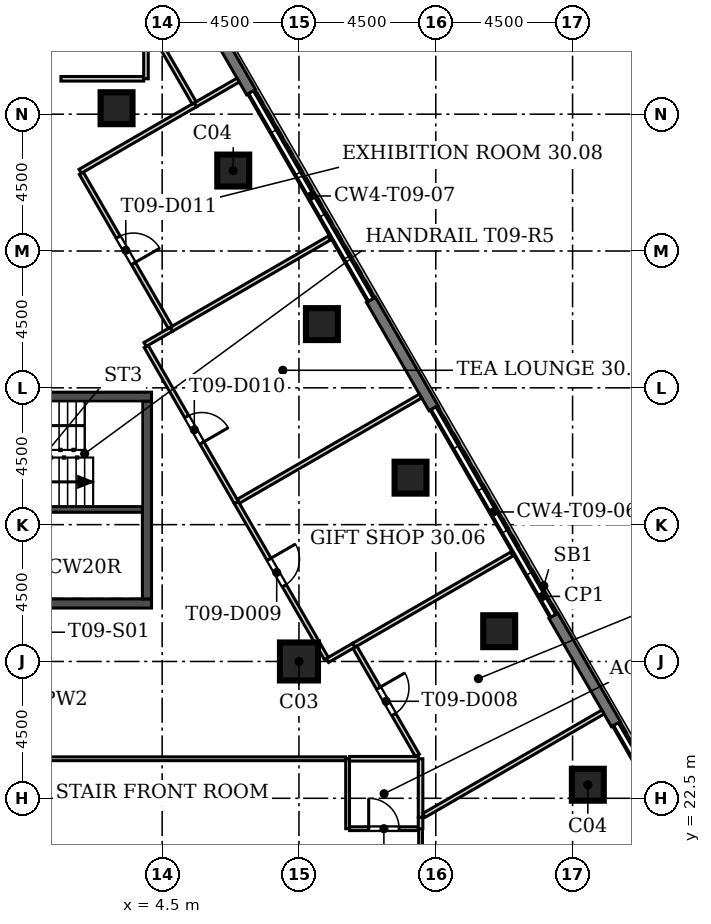
"""IFC4 building model, lengths in metres.
Left out: names, types, materials, properties, quantities, classifications, styles, units other than length and angle.
Written with IfcOpenShell. Run it as: python <this file> out.ifc"""

import sys

from ifc_helpers import new_model, si_unit, direction, frame, frame_2d, origin, origin_2d, place, context, subcontext, project, spatial, rectangle, extrude, element, fill, save


model = new_model("IFC4")
c1 = context("Model", 3, precision=1e-05, world=origin(), true_north=direction((0.0, 1.0)))
c2 = subcontext(c1, "Body", "Model", "MODEL_VIEW")
j1 = project(units=[si_unit("LENGTHUNIT", "METRE"), si_unit("PLANEANGLEUNIT", "RADIAN")], contexts=[c1])
p1 = place(None, origin())
s1 = spatial("IfcSite", under=j1, at=p1, CompositionType="ELEMENT")
p2 = place(p1, origin())
s2 = spatial("IfcBuilding", under=s1, at=p2, CompositionType="ELEMENT")
p3 = place(p2, frame((0.0, 0.0, 137.5)))
s3 = spatial("IfcBuildingStorey", under=s2, at=p3, CompositionType="ELEMENT", Elevation=137.5)
for number, where, z_axis, x_axis in (
    (1, (18.502, 22.945, 0.0), (0.0, 0.0, 1.0), (1.0, 0.0, 0.0)),
    (2, (15.586, 27.995, 0.0), (0.0, 0.0, 1.0), (1.0, 0.0, 0.0)),
    (3, (12.67, 33.046, 0.0), (0.0, 0.0, 1.0), (1.0, 0.0, 0.0)),
    (4, (9.754, 38.096, 0.0), (0.0, 0.0, 1.0), (1.0, 0.0, 0.0)),
    (5, (6.838, 43.146, 0.0), (0.0, 0.0, 1.0), (1.0, 0.0, 0.0)),
    (6, (3.0, 45.197, 0.0), (0.0, 0.0, 1.0), (1.0, 0.0, 0.0)),
):
    element("IfcColumn", number, at=place(p3, frame(where, z_axis=z_axis, x_axis=x_axis)), inside=s3, PredefinedType="COLUMN", context=c2, shape_type="SweptSolid", body=[
        extrude(rectangle(XDim=1.05, YDim=1.05, at=origin_2d()), origin(), (0.0, 0.0, 1.0), 5.4),
    ])
p4 = place(p3, frame((9.0, 27.0, 0.0), z_axis=(0.0, 0.0, 1.0), x_axis=(1.0, 0.0, 0.0)))
e7 = element("IfcColumn", 7, at=p4, inside=s3, PredefinedType="COLUMN", context=c2, shape_type="SweptSolid", body=[
    extrude(rectangle(XDim=1.25, YDim=1.25, at=origin_2d()), origin(), (0.0, 0.0, 1.0), 5.4),
])
for number, where, z_axis, x_axis in (
    (8, (19.426, 24.939, 0.0), (0.0, 0.0, 1.0), (-0.5, 0.866, 0.0)),
    (9, (13.426, 35.332, 0.0), (0.0, 0.0, 1.0), (-0.5, 0.866, 0.0)),
):
    element("IfcWall", number, at=place(p3, frame(where, z_axis=z_axis, x_axis=x_axis)), inside=s3, PredefinedType="SOLIDWALL", context=c2, shape_type="SweptSolid", body=[
        extrude(rectangle(XDim=4.115, YDim=0.34, at=frame_2d((2.058, 0.0))), origin(), (0.0, 0.0, 1.0), 5.0),
    ])
p5 = place(p3, frame((7.426, 45.724, 0.0), z_axis=(0.0, 0.0, 1.0), x_axis=(-0.500018155671, 0.866014921349, 0.0)))
e10 = element("IfcWall", 10, at=p5, inside=s3, PredefinedType="SOLIDWALL", context=c2, shape_type="SweptSolid", body=[
    extrude(rectangle(XDim=6.146, YDim=0.34, at=frame_2d((3.073, 0.0))), origin(), (0.0, 0.0, 1.0), 5.0),
])
p6 = place(p3, frame((-4.15, 28.907, -0.4), z_axis=(0.0, 0.0, 1.0), x_axis=(1.0, 0.0, 0.0)))
e11 = element("IfcWall", 11, at=p6, inside=s3, PredefinedType="SOLIDWALL", context=c2, shape_type="SweptSolid", body=[
    extrude(rectangle(XDim=8.3, YDim=0.3, at=frame_2d((4.15, 0.0))), origin(), (0.0, 0.0, 1.0), 5.4),
])
p7 = place(p6, frame((1.55, 0.0, 0.4)))
e12 = element("IfcOpeningElement", 12, at=p7, cuts=e11, PredefinedType="OPENING", context=c2, shape_type="SweptSolid", body=[
    extrude(rectangle(XDim=1.2, YDim=2.1, at=frame_2d((0.6, 1.05))), frame((0.0, 0.16, 0.0), z_axis=(0.0, -1.0, 0.0), x_axis=(1.0, 0.0, 0.0)), (0.0, 0.0, 1.0), 0.32),
])
p8 = place(p3, frame((-4.15, 35.707, -0.4), z_axis=(0.0, 0.0, 1.0), x_axis=(1.0, 0.0, 0.0)))
e13 = element("IfcWall", 13, at=p8, inside=s3, PredefinedType="SOLIDWALL", context=c2, shape_type="SweptSolid", body=[
    extrude(rectangle(XDim=8.3, YDim=0.3, at=frame_2d((4.15, 0.0))), origin(), (0.0, 0.0, 1.0), 5.4),
])
p9 = place(p3, frame((4.0, 29.057, -0.4), z_axis=(0.0, 0.0, 1.0), x_axis=(0.0, 1.0, 0.0)))
e14 = element("IfcWall", 14, at=p9, inside=s3, PredefinedType="SOLIDWALL", context=c2, shape_type="SweptSolid", body=[
    extrude(rectangle(XDim=6.5, YDim=0.3, at=frame_2d((3.25, 0.0))), origin(), (0.0, 0.0, 1.0), 5.4),
])
p10 = place(p3, frame((-3.85, 32.007, -0.4), z_axis=(0.0, 0.0, 1.0), x_axis=(1.0, 0.0, 0.0)))
e15 = element("IfcWall", 15, at=p10, inside=s3, PredefinedType="SOLIDWALL", context=c2, shape_type="SweptSolid", body=[
    extrude(rectangle(XDim=7.7, YDim=0.2, at=frame_2d((3.85, 0.0))), origin(), (0.0, 0.0, 1.0), 5.4),
])
p11 = place(p10, frame((0.1, 0.0, 0.4)))
e16 = element("IfcOpeningElement", 16, at=p11, cuts=e15, PredefinedType="OPENING", context=c2, shape_type="SweptSolid", body=[
    extrude(rectangle(XDim=1.2, YDim=2.1, at=frame_2d((0.6, 1.05))), frame((0.0, 0.11, 0.0), z_axis=(0.0, -1.0, 0.0), x_axis=(1.0, 0.0, 0.0)), (0.0, 0.0, 1.0), 0.22),
])
p12 = place(p3, frame((10.6, 23.8, 0.0), z_axis=(0.0, 0.0, 1.0), x_axis=(0.0, -1.0, 0.0)))
e17 = element("IfcWall", 17, at=p12, inside=s3, PredefinedType="PARTITIONING", context=c2, shape_type="SweptSolid", body=[
    extrude(rectangle(XDim=2.3, YDim=0.125, at=frame_2d((1.15, 0.0))), origin(), (0.0, 0.0, 1.0), 5.0),
])
p13 = place(p3, frame((10.663, 21.5, 0.0), z_axis=(0.0, 0.0, 1.0), x_axis=(1.0, 0.0, 0.0)))
e18 = element("IfcWall", 18, at=p13, inside=s3, PredefinedType="PARTITIONING", context=c2, shape_type="SweptSolid", body=[
    extrude(rectangle(XDim=2.262, YDim=0.125, at=frame_2d((1.131, 0.0))), origin(), (0.0, 0.0, 1.0), 5.0),
])
p14 = place(p13, frame((0.631, 0.0, 0.0)))
e19 = element("IfcOpeningElement", 19, at=p14, cuts=e18, PredefinedType="OPENING", context=c2, shape_type="SweptSolid", body=[
    extrude(rectangle(XDim=1.0, YDim=2.1, at=frame_2d((0.5, 1.05))), frame((0.0, 0.073, 0.0), z_axis=(0.0, -1.0, 0.0), x_axis=(1.0, 0.0, 0.0)), (0.0, 0.0, 1.0), 0.145),
])
p15 = place(p3, frame((-11.804, 23.8, 0.0), z_axis=(0.0, 0.0, 1.0), x_axis=(1.0, 0.0, 0.0)))
e20 = element("IfcWall", 20, at=p15, inside=s3, PredefinedType="PARTITIONING", context=c2, shape_type="SweptSolid", body=[
    extrude(rectangle(XDim=22.342, YDim=0.125, at=frame_2d((11.171, 0.0))), origin(), (0.0, 0.0, 1.0), 5.0),
])
p16 = place(p15, frame((7.538, 0.0, 0.0)))
e21 = element("IfcOpeningElement", 21, at=p16, cuts=e20, PredefinedType="OPENING", context=c2, shape_type="SweptSolid", body=[
    extrude(rectangle(XDim=1.8, YDim=2.1, at=frame_2d((0.9, 1.05))), frame((0.0, 0.073, 0.0), z_axis=(0.0, -1.0, 0.0), x_axis=(1.0, 0.0, 0.0)), (0.0, 0.0, 1.0), 0.145),
])
p17 = place(p15, frame((10.271, 0.0, 0.0)))
e22 = element("IfcOpeningElement", 22, at=p17, cuts=e20, PredefinedType="OPENING", context=c2, shape_type="SweptSolid", body=[
    extrude(rectangle(XDim=1.8, YDim=2.1, at=frame_2d((0.9, 1.05))), frame((0.0, 0.073, 0.0), z_axis=(0.0, -1.0, 0.0), x_axis=(1.0, 0.0, 0.0)), (0.0, 0.0, 1.0), 0.145),
])
p18 = place(p3, frame((13.0, 21.5, 0.0), z_axis=(0.0, 0.0, 1.0), x_axis=(0.0, -1.0, 0.0)))
e23 = element("IfcWall", 23, at=p18, inside=s3, PredefinedType="PARTITIONING", context=c2, shape_type="SweptSolid", body=[
    extrude(rectangle(XDim=2.637, YDim=0.125, at=frame_2d((1.319, 0.0))), origin(), (0.0, 0.0, 1.0), 5.0),
])
p19 = place(p3, frame((13.0, 23.8, 0.0), z_axis=(0.0, 0.0, 1.0), x_axis=(0.0, -1.0, 0.0)))
e24 = element("IfcWall", 24, at=p19, inside=s3, PredefinedType="PARTITIONING", context=c2, shape_type="SweptSolid", body=[
    extrude(rectangle(XDim=1.927, YDim=0.15, at=frame_2d((0.964, 0.0))), origin(), (0.0, 0.0, 1.0), 5.0),
])
p20 = place(p3, frame((10.663, 23.8, 0.0), z_axis=(0.0, 0.0, 1.0), x_axis=(1.0, 0.0, 0.0)))
e25 = element("IfcWall", 25, at=p20, inside=s3, PredefinedType="PARTITIONING", context=c2, shape_type="SweptSolid", body=[
    extrude(rectangle(XDim=2.261, YDim=0.15, at=frame_2d((1.131, 0.0))), origin(), (0.0, 0.0, 1.0), 5.0),
])
p21 = place(p3, frame((13.0, 21.873, 0.0), z_axis=(0.0, 0.0, 1.0), x_axis=(0.0, -1.0, 0.0)))
e26 = element("IfcWall", 26, at=p21, inside=s3, PredefinedType="PARTITIONING", context=c2, shape_type="SweptSolid", body=[
    extrude(rectangle(XDim=0.373, YDim=0.15, at=frame_2d((0.187, 0.0))), origin(), (0.0, 0.0, 1.0), 5.0),
])
p22 = place(p3, frame((10.804, 27.533, 0.0), z_axis=(0.0, 0.0, 1.0), x_axis=(0.866031096941, 0.499990139034, 0.0)))
e27 = element("IfcWall", 27, at=p22, inside=s3, PredefinedType="PARTITIONING", context=c2, shape_type="SweptSolid", body=[
    extrude(rectangle(XDim=6.0, YDim=0.15, at=frame_2d((3.0, 0.0))), origin(), (0.0, 0.0, 1.0), 5.0),
])
p23 = place(p3, frame((12.894, 23.913, 0.0), z_axis=(0.0, 0.0, 1.0), x_axis=(-0.499983290286, 0.866035050927, 0.0)))
e28 = element("IfcWall", 28, at=p23, inside=s3, PredefinedType="PARTITIONING", context=c2, shape_type="SweptSolid", body=[
    extrude(rectangle(XDim=4.105, YDim=0.15, at=frame_2d((2.053, 0.0))), origin(), (0.0, 0.0, 1.0), 5.0),
])
p24 = place(p23, frame((1.552, 0.0, 0.0)))
e29 = element("IfcOpeningElement", 29, at=p24, cuts=e28, PredefinedType="OPENING", context=c2, shape_type="SweptSolid", body=[
    extrude(rectangle(XDim=1.0, YDim=2.1, at=frame_2d((0.5, 1.05))), frame((0.0, 0.085, 0.0), z_axis=(0.0, -1.0, 0.0), x_axis=(1.0, 0.0, 0.0)), (0.0, 0.0, 1.0), 0.17),
])
p25 = place(p3, frame((19.0, 25.337, 0.0), z_axis=(0.0, 0.0, 1.0), x_axis=(-0.866028893315, -0.499993955907, 0.0)))
e30 = element("IfcWall", 30, at=p25, inside=s3, PredefinedType="PARTITIONING", context=c2, shape_type="SweptSolid", body=[
    extrude(rectangle(XDim=6.798, YDim=0.15, at=frame_2d((3.399, 0.0))), origin(), (0.0, 0.0, 1.0), 5.0),
])
p26 = place(p3, frame((7.003, 32.267, 0.0), z_axis=(0.0, 0.0, 1.0), x_axis=(0.866034706034, 0.499983887685, 0.0)))
e31 = element("IfcWall", 31, at=p26, inside=s3, PredefinedType="PARTITIONING", context=c2, shape_type="SweptSolid", body=[
    extrude(rectangle(XDim=6.925, YDim=0.15, at=frame_2d((3.462, 0.0))), origin(), (0.0, 0.0, 1.0), 5.0),
])
p27 = place(p3, frame((10.804, 27.533, 0.0), z_axis=(0.0, 0.0, 1.0), x_axis=(-0.866010750942, -0.50002537861, 0.0)))
e32 = element("IfcWall", 32, at=p27, inside=s3, PredefinedType="PARTITIONING", context=c2, shape_type="SweptSolid", body=[
    extrude(rectangle(XDim=1.0, YDim=0.15, at=frame_2d((0.5, 0.0))), origin(), (0.0, 0.0, 1.0), 5.0),
])
p28 = place(p3, frame((9.9, 27.098, 0.0), z_axis=(0.0, 0.0, 1.0), x_axis=(-0.500144624036, 0.865941888956, 0.0)))
e33 = element("IfcWall", 33, at=p28, inside=s3, PredefinedType="PARTITIONING", context=c2, shape_type="SweptSolid", body=[
    extrude(rectangle(XDim=0.551, YDim=0.15, at=frame_2d((0.275, 0.0))), origin(), (0.0, 0.0, 1.0), 5.0),
])
p29 = place(p3, frame((9.596, 27.625, 0.0), z_axis=(0.0, 0.0, 1.0), x_axis=(-0.500025873786, 0.866010465032, 0.0)))
e34 = element("IfcWall", 34, at=p29, inside=s3, PredefinedType="PARTITIONING", context=c2, shape_type="SweptSolid", body=[
    extrude(rectangle(XDim=5.317, YDim=0.15, at=frame_2d((2.658, 0.0))), origin(), (0.0, 0.0, 1.0), 5.0),
])
p30 = place(p29, frame((2.158, 0.0, 0.0)))
e35 = element("IfcOpeningElement", 35, at=p30, cuts=e34, PredefinedType="OPENING", context=c2, shape_type="SweptSolid", body=[
    extrude(rectangle(XDim=1.0, YDim=2.1, at=frame_2d((0.5, 1.05))), frame((0.0, 0.085, 0.0), z_axis=(0.0, -1.0, 0.0), x_axis=(1.0, 0.0, 0.0)), (0.0, 0.0, 1.0), 0.17),
])
p31 = place(p3, frame((4.804, 37.925, 0.0), z_axis=(0.0, 0.0, 1.0), x_axis=(0.866031096941, 0.499990139034, 0.0)))
e36 = element("IfcWall", 36, at=p31, inside=s3, PredefinedType="PARTITIONING", context=c2, shape_type="SweptSolid", body=[
    extrude(rectangle(XDim=6.0, YDim=0.15, at=frame_2d((3.0, 0.0))), origin(), (0.0, 0.0, 1.0), 5.0),
])
p32 = place(p3, frame((6.938, 32.229, 0.0), z_axis=(0.0, 0.0, 1.0), x_axis=(-0.499994727438, 0.866028447878, 0.0)))
e37 = element("IfcWall", 37, at=p32, inside=s3, PredefinedType="PARTITIONING", context=c2, shape_type="SweptSolid", body=[
    extrude(rectangle(XDim=5.925, YDim=0.15, at=frame_2d((2.962, 0.0))), origin(), (0.0, 0.0, 1.0), 5.0),
])
p33 = place(p32, frame((2.261, 0.0, 0.0)))
e38 = element("IfcOpeningElement", 38, at=p33, cuts=e37, PredefinedType="OPENING", context=c2, shape_type="SweptSolid", body=[
    extrude(rectangle(XDim=1.0, YDim=2.1, at=frame_2d((0.5, 1.05))), frame((0.0, 0.085, 0.0), z_axis=(0.0, -1.0, 0.0), x_axis=(1.0, 0.0, 0.0)), (0.0, 0.0, 1.0), 0.17),
])
p34 = place(p3, frame((3.938, 37.425, 0.0), z_axis=(0.0, 0.0, 1.0), x_axis=(0.866010750942, 0.50002537861, 0.0)))
e39 = element("IfcWall", 39, at=p34, inside=s3, PredefinedType="PARTITIONING", context=c2, shape_type="SweptSolid", body=[
    extrude(rectangle(XDim=1.0, YDim=0.15, at=frame_2d((0.5, 0.0))), origin(), (0.0, 0.0, 1.0), 5.0),
])
p35 = place(p3, frame((4.766, 37.99, 0.0), z_axis=(0.0, 0.0, 1.0), x_axis=(-0.500012662943, 0.866018092707, 0.0)))
e40 = element("IfcWall", 40, at=p35, inside=s3, PredefinedType="PARTITIONING", context=c2, shape_type="SweptSolid", body=[
    extrude(rectangle(XDim=5.85, YDim=0.15, at=frame_2d((2.925, 0.0))), origin(), (0.0, 0.0, 1.0), 5.0),
])
p36 = place(p35, frame((2.425, 0.0, 0.0)))
e41 = element("IfcOpeningElement", 41, at=p36, cuts=e40, PredefinedType="OPENING", context=c2, shape_type="SweptSolid", body=[
    extrude(rectangle(XDim=1.0, YDim=2.1, at=frame_2d((0.5, 1.05))), frame((0.0, 0.085, 0.0), z_axis=(0.0, -1.0, 0.0), x_axis=(1.0, 0.0, 0.0)), (0.0, 0.0, 1.0), 0.17),
])
p37 = place(p3, frame((1.804, 43.122, 0.0), z_axis=(0.0, 0.0, 1.0), x_axis=(0.866032173762, 0.499988273872, 0.0)))
e42 = element("IfcWall", 42, at=p37, inside=s3, PredefinedType="PARTITIONING", context=c2, shape_type="SweptSolid", body=[
    extrude(rectangle(XDim=4.373, YDim=0.15, at=frame_2d((2.186, 0.0))), origin(), (0.0, 0.0, 1.0), 5.0),
])
p38 = place(p3, frame((5.591, 45.308, 0.0), z_axis=(0.0, 0.0, 1.0), x_axis=(0.866028203713, 0.499995150351, 0.0)))
e43 = element("IfcWall", 43, at=p38, inside=s3, PredefinedType="PARTITIONING", context=c2, shape_type="SweptSolid", body=[
    extrude(rectangle(XDim=1.627, YDim=0.15, at=frame_2d((0.814, 0.0))), origin(), (0.0, 0.0, 1.0), 5.0),
])
p39 = place(p3, frame((1.17, 46.164, 0.0), z_axis=(0.0, 0.0, 1.0), x_axis=(1.0, 0.0, 0.0)))
e44 = element("IfcWall", 44, at=p39, inside=s3, PredefinedType="PARTITIONING", context=c2, shape_type="SweptSolid", body=[
    extrude(rectangle(XDim=2.723, YDim=0.15, at=frame_2d((1.361, 0.0))), origin(), (0.0, 0.0, 1.0), 5.0),
])
p40 = place(p3, frame((3.968, 46.164, 0.0), z_axis=(0.0, 0.0, 1.0), x_axis=(0.0, 1.0, 0.0)))
e45 = element("IfcWall", 45, at=p40, inside=s3, PredefinedType="PARTITIONING", context=c2, shape_type="SweptSolid", body=[
    extrude(rectangle(XDim=1.507, YDim=0.15, at=frame_2d((0.754, 0.0))), origin(), (0.0, 0.0, 1.0), 5.0),
])
p41 = place(p3, frame((4.226, 47.672, 0.0), z_axis=(0.0, 0.0, 1.0), x_axis=(0.499977226672, -0.866038551572, 0.0)))
e46 = element("IfcWall", 46, at=p41, inside=s3, PredefinedType="PARTITIONING", context=c2, shape_type="SweptSolid", body=[
    extrude(rectangle(XDim=2.654, YDim=0.15, at=frame_2d((1.327, 0.0))), origin(), (0.0, 0.0, 1.0), 4.2),
])
p42 = place(p14, origin())
e47 = element("IfcDoor", 47, at=p42, inside=s3, OperationType="SINGLE_SWING_LEFT", PredefinedType="DOOR", context=c2, shape_type="SweptSolid", body=[
    extrude(rectangle(XDim=1.0, YDim=2.1, at=frame_2d((0.5, 1.05))), frame((0.0, 0.025, 0.0), z_axis=(0.0, -1.0, 0.0), x_axis=(1.0, 0.0, 0.0)), (0.0, 0.0, 1.0), 0.05),
])
fill(e19, e47)
p43 = place(p24, frame((1.0, 0.0, 0.0), z_axis=(0.0, 0.0, 1.0), x_axis=(-1.0, 0.0, 0.0)))
e48 = element("IfcDoor", 48, at=p43, inside=s3, OperationType="SINGLE_SWING_LEFT", PredefinedType="DOOR", context=c2, shape_type="SweptSolid", body=[
    extrude(rectangle(XDim=1.0, YDim=2.1, at=frame_2d((0.5, 1.05))), frame((0.0, 0.025, 0.0), z_axis=(0.0, -1.0, 0.0), x_axis=(1.0, 0.0, 0.0)), (0.0, 0.0, 1.0), 0.05),
])
fill(e29, e48)
p44 = place(p30, frame((1.0, 0.0, 0.0), z_axis=(0.0, 0.0, 1.0), x_axis=(-1.0, 0.0, 0.0)))
e49 = element("IfcDoor", 49, at=p44, inside=s3, OperationType="SINGLE_SWING_LEFT", PredefinedType="DOOR", context=c2, shape_type="SweptSolid", body=[
    extrude(rectangle(XDim=1.0, YDim=2.1, at=frame_2d((0.5, 1.05))), frame((0.0, 0.025, 0.0), z_axis=(0.0, -1.0, 0.0), x_axis=(1.0, 0.0, 0.0)), (0.0, 0.0, 1.0), 0.05),
])
fill(e35, e49)
p45 = place(p33, frame((1.0, 0.0, 0.0), z_axis=(0.0, 0.0, 1.0), x_axis=(-1.0, 0.0, 0.0)))
e50 = element("IfcDoor", 50, at=p45, inside=s3, OperationType="SINGLE_SWING_RIGHT", PredefinedType="DOOR", context=c2, shape_type="SweptSolid", body=[
    extrude(rectangle(XDim=1.0, YDim=2.1, at=frame_2d((0.5, 1.05))), frame((0.0, 0.025, 0.0), z_axis=(0.0, -1.0, 0.0), x_axis=(1.0, 0.0, 0.0)), (0.0, 0.0, 1.0), 0.05),
])
fill(e38, e50)
p46 = place(p36, frame((1.0, 0.0, 0.0), z_axis=(0.0, 0.0, 1.0), x_axis=(-1.0, 0.0, 0.0)))
e51 = element("IfcDoor", 51, at=p46, inside=s3, OperationType="SINGLE_SWING_RIGHT", PredefinedType="DOOR", context=c2, shape_type="SweptSolid", body=[
    extrude(rectangle(XDim=1.0, YDim=2.1, at=frame_2d((0.5, 1.05))), frame((0.0, 0.025, 0.0), z_axis=(0.0, -1.0, 0.0), x_axis=(1.0, 0.0, 0.0)), (0.0, 0.0, 1.0), 0.05),
])
fill(e41, e51)
save(model, sys.argv[1])
